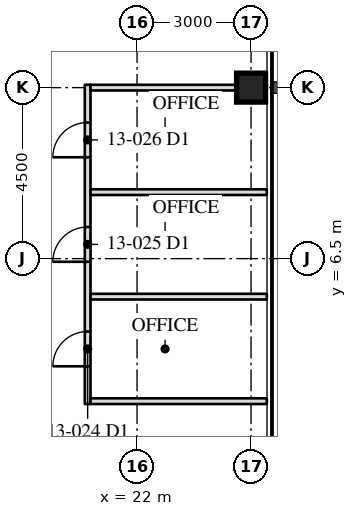
"""IFC4 building model, lengths in metres.
Left out: names, types, materials, properties, quantities, classifications, styles, units other than length and angle.
Written with IfcOpenShell. Run it as: python <this file> out.ifc"""

import sys

from ifc_helpers import new_model, si_unit, direction, frame, frame_2d, origin, origin_2d, place, context, subcontext, project, spatial, rectangle, hollow_rectangle, extrude, element, fill, save


model = new_model("IFC4")
c1 = context("Model", 3, precision=1e-05, world=origin(), true_north=direction((0.0, 1.0)))
c2 = subcontext(c1, "Body", "Model", "MODEL_VIEW")
j1 = project(units=[si_unit("LENGTHUNIT", "METRE"), si_unit("PLANEANGLEUNIT", "RADIAN")], contexts=[c1])
p1 = place(None, origin())
s1 = spatial("IfcSite", under=j1, at=p1, CompositionType="ELEMENT")
p2 = place(p1, origin())
s2 = spatial("IfcBuilding", under=s1, at=p2, CompositionType="ELEMENT")
p3 = place(p2, frame((0.0, 0.0, 57.0)))
s3 = spatial("IfcBuildingStorey", under=s2, at=p3, CompositionType="ELEMENT", Elevation=57.0)
p4 = place(p3, frame((25.0, 11.0, 0.0), z_axis=(0.0, 0.0, 1.0), x_axis=(0.0, 1.0, 0.0)))
e1 = element("IfcColumn", 1, at=p4, inside=s3, PredefinedType="COLUMN", context=c2, shape_type="SweptSolid", body=[
    extrude(hollow_rectangle(XDim=0.762, YDim=0.762, WallThickness=0.127, at=origin_2d()), origin(), (0.0, 0.0, 1.0), 4.1),
])
p5 = place(p3, frame((20.7, 2.675, 0.0), z_axis=(0.0, 0.0, 1.0), x_axis=(0.0, 1.0, 0.0)))
e2 = element("IfcWall", 2, at=p5, inside=s3, PredefinedType="PARTITIONING", context=c2, shape_type="SweptSolid", body=[
    extrude(rectangle(XDim=8.4, YDim=0.15, at=frame_2d((4.2, 0.0))), origin(), (0.0, 0.0, 1.0), 3.91),
])
p6 = place(p5, frame((0.992, 0.0, 0.0)))
e3 = element("IfcOpeningElement", 3, at=p6, cuts=e2, PredefinedType="OPENING", context=c2, shape_type="SweptSolid", body=[
    extrude(rectangle(XDim=0.915, YDim=2.134, at=frame_2d((0.458, 1.067))), frame((0.0, 0.085, 0.0), z_axis=(0.0, -1.0, 0.0), x_axis=(1.0, 0.0, 0.0)), (0.0, 0.0, 1.0), 0.17),
])
p7 = place(p5, frame((3.742, 0.0, 0.0)))
e4 = element("IfcOpeningElement", 4, at=p7, cuts=e2, PredefinedType="OPENING", context=c2, shape_type="SweptSolid", body=[
    extrude(rectangle(XDim=0.915, YDim=2.134, at=frame_2d((0.458, 1.067))), frame((0.0, 0.085, 0.0), z_axis=(0.0, -1.0, 0.0), x_axis=(1.0, 0.0, 0.0)), (0.0, 0.0, 1.0), 0.17),
])
p8 = place(p5, frame((6.492, 0.0, 0.0)))
e5 = element("IfcOpeningElement", 5, at=p8, cuts=e2, PredefinedType="OPENING", context=c2, shape_type="SweptSolid", body=[
    extrude(rectangle(XDim=0.915, YDim=2.134, at=frame_2d((0.458, 1.067))), frame((0.0, 0.085, 0.0), z_axis=(0.0, -1.0, 0.0), x_axis=(1.0, 0.0, 0.0)), (0.0, 0.0, 1.0), 0.17),
])
for number, where, z_axis, x_axis in (
    (6, (20.775, 2.75, 0.0), (0.0, 0.0, 1.0), (1.0, 0.0, 0.0)),
    (7, (20.775, 5.5, 0.0), (0.0, 0.0, 1.0), (1.0, 0.0, 0.0)),
    (8, (20.775, 8.25, 0.0), (0.0, 0.0, 1.0), (1.0, 0.0, 0.0)),
):
    element("IfcWall", number, at=place(p3, frame(where, z_axis=z_axis, x_axis=x_axis)), inside=s3, PredefinedType="PARTITIONING", context=c2, shape_type="SweptSolid", body=[
        extrude(rectangle(XDim=4.64, YDim=0.15, at=frame_2d((2.32, 0.0))), origin(), (0.0, 0.0, 1.0), 3.91),
    ])
p9 = place(p3, frame((20.775, 11.0, 0.0), z_axis=(0.0, 0.0, 1.0), x_axis=(1.0, 0.0, 0.0)))
e9 = element("IfcWall", 9, at=p9, inside=s3, PredefinedType="PARTITIONING", context=c2, shape_type="SweptSolid", body=[
    extrude(rectangle(XDim=4.64, YDim=0.15, at=frame_2d((2.32, 0.0))), origin(), (0.0, 0.0, 1.0), 3.13),
])
p10 = place(p6, origin())
e10 = element("IfcDoor", 10, at=p10, inside=s3, OperationType="SINGLE_SWING_LEFT", PredefinedType="DOOR", context=c2, shape_type="SweptSolid", body=[
    extrude(rectangle(XDim=0.915, YDim=2.134, at=frame_2d((0.458, 1.067))), frame((0.0, 0.025, 0.0), z_axis=(0.0, -1.0, 0.0), x_axis=(1.0, 0.0, 0.0)), (0.0, 0.0, 1.0), 0.05),
])
fill(e3, e10)
p11 = place(p7, origin())
e11 = element("IfcDoor", 11, at=p11, inside=s3, OperationType="SINGLE_SWING_LEFT", PredefinedType="DOOR", context=c2, shape_type="SweptSolid", body=[
    extrude(rectangle(XDim=0.915, YDim=2.134, at=frame_2d((0.458, 1.067))), frame((0.0, 0.025, 0.0), z_axis=(0.0, -1.0, 0.0), x_axis=(1.0, 0.0, 0.0)), (0.0, 0.0, 1.0), 0.05),
])
fill(e4, e11)
p12 = place(p8, origin())
e12 = element("IfcDoor", 12, at=p12, inside=s3, OperationType="SINGLE_SWING_LEFT", PredefinedType="DOOR", context=c2, shape_type="SweptSolid", body=[
    extrude(rectangle(XDim=0.915, YDim=2.134, at=frame_2d((0.458, 1.067))), frame((0.0, 0.025, 0.0), z_axis=(0.0, -1.0, 0.0), x_axis=(1.0, 0.0, 0.0)), (0.0, 0.0, 1.0), 0.05),
])
fill(e5, e12)
save(model, sys.argv[1])
